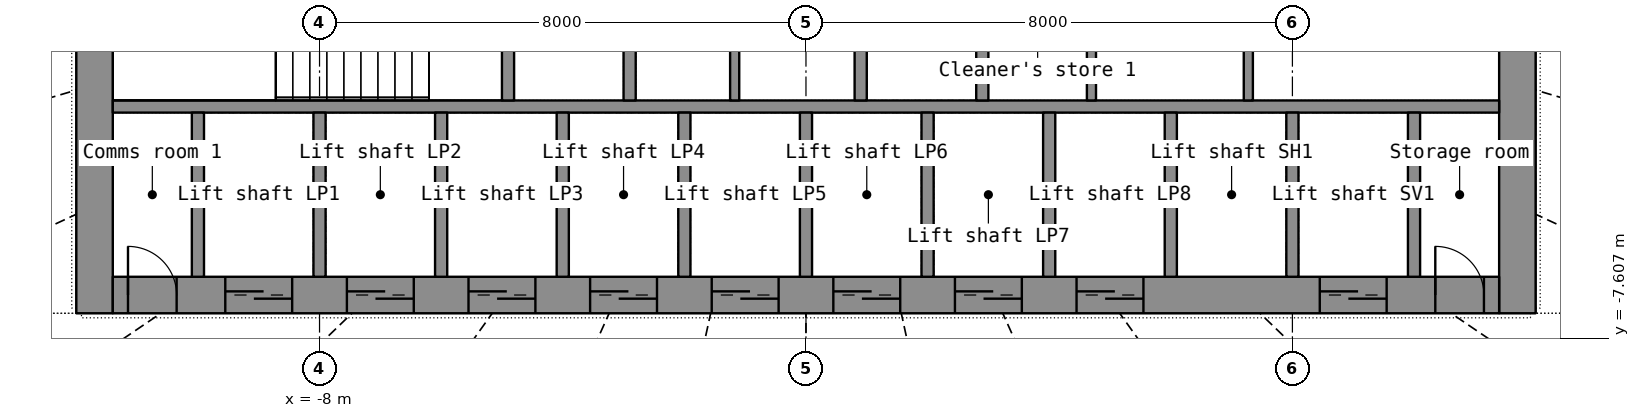
"""IFC4 building model, lengths in metres.
Left out: names, types, materials, properties, quantities, classifications, styles, units other than length and angle.
Written with IfcOpenShell. Run it as: python <this file> out.ifc"""

import sys

from ifc_helpers import new_model, si_unit, direction, frame, frame_2d, origin, place, context, subcontext, project, spatial, rectangle, extrude, element, fill, save


model = new_model("IFC4")
c1 = context("Model", 3, precision=1e-05, world=origin(), true_north=direction((0.0, 1.0)))
c2 = subcontext(c1, "Body", "Model", "MODEL_VIEW")
j1 = project(units=[si_unit("LENGTHUNIT", "METRE"), si_unit("PLANEANGLEUNIT", "RADIAN")], contexts=[c1])
p1 = place(None, origin())
s1 = spatial("IfcSite", under=j1, at=p1, CompositionType="ELEMENT")
p2 = place(p1, origin())
s2 = spatial("IfcBuilding", under=s1, at=p2, CompositionType="ELEMENT")
p3 = place(p2, frame((0.0, 0.0, 13.5)))
s3 = spatial("IfcBuildingStorey", under=s2, at=p3, CompositionType="ELEMENT", Elevation=13.5)
p4 = place(p3, frame((-11.7, -7.2, 0.0), z_axis=(0.0, 0.0, 1.0), x_axis=(0.0, 1.0, 0.0)))
e1 = element("IfcWall", 1, at=p4, inside=s3, PredefinedType="SHEAR", context=c2, shape_type="SweptSolid", body=[
    extrude(rectangle(XDim=14.4, YDim=0.6, at=frame_2d((7.2, 0.0))), origin(), (0.0, 0.0, 1.0), 6.1),
])
p5 = place(p4, frame((6.5, 0.0, 0.0)))
e2 = element("IfcOpeningElement", 2, at=p5, cuts=e1, PredefinedType="OPENING", context=c2, shape_type="SweptSolid", body=[
    extrude(rectangle(XDim=1.4, YDim=2.2, at=frame_2d((0.7, 1.1))), frame((0.0, 0.31, 0.0), z_axis=(0.0, -1.0, 0.0), x_axis=(1.0, 0.0, 0.0)), (0.0, 0.0, 1.0), 0.62),
])
p6 = place(p3, frame((11.7, -7.2, 0.0), z_axis=(0.0, 0.0, 1.0), x_axis=(0.0, 1.0, 0.0)))
e3 = element("IfcWall", 3, at=p6, inside=s3, PredefinedType="SHEAR", context=c2, shape_type="SweptSolid", body=[
    extrude(rectangle(XDim=14.4, YDim=0.6, at=frame_2d((7.2, 0.0))), origin(), (0.0, 0.0, 1.0), 6.1),
])
p7 = place(p6, frame((6.5, 0.0, 0.0)))
e4 = element("IfcOpeningElement", 4, at=p7, cuts=e3, PredefinedType="OPENING", context=c2, shape_type="SweptSolid", body=[
    extrude(rectangle(XDim=1.4, YDim=2.2, at=frame_2d((0.7, 1.1))), frame((0.0, 0.31, 0.0), z_axis=(0.0, -1.0, 0.0), x_axis=(1.0, 0.0, 0.0)), (0.0, 0.0, 1.0), 0.62),
])
p8 = place(p3, frame((-11.4, -6.9, 0.0), z_axis=(0.0, 0.0, 1.0), x_axis=(1.0, 0.0, 0.0)))
e5 = element("IfcWall", 5, at=p8, inside=s3, PredefinedType="SHEAR", context=c2, shape_type="SweptSolid", body=[
    extrude(rectangle(XDim=22.8, YDim=0.6, at=frame_2d((11.4, 0.0))), origin(), (0.0, 0.0, 1.0), 6.1),
])
p9 = place(p8, frame((1.85, 0.0, 0.0)))
e6 = element("IfcOpeningElement", 6, at=p9, cuts=e5, PredefinedType="OPENING", context=c2, shape_type="SweptSolid", body=[
    extrude(rectangle(XDim=1.1, YDim=2.2, at=frame_2d((0.55, 1.1))), frame((0.0, 0.31, 0.0), z_axis=(0.0, -1.0, 0.0), x_axis=(1.0, 0.0, 0.0)), (0.0, 0.0, 1.0), 0.62),
])
p10 = place(p8, frame((3.85, 0.0, 0.0)))
e7 = element("IfcOpeningElement", 7, at=p10, cuts=e5, PredefinedType="OPENING", context=c2, shape_type="SweptSolid", body=[
    extrude(rectangle(XDim=1.1, YDim=2.2, at=frame_2d((0.55, 1.1))), frame((0.0, 0.31, 0.0), z_axis=(0.0, -1.0, 0.0), x_axis=(1.0, 0.0, 0.0)), (0.0, 0.0, 1.0), 0.62),
])
p11 = place(p8, frame((5.85, 0.0, 0.0)))
e8 = element("IfcOpeningElement", 8, at=p11, cuts=e5, PredefinedType="OPENING", context=c2, shape_type="SweptSolid", body=[
    extrude(rectangle(XDim=1.1, YDim=2.2, at=frame_2d((0.55, 1.1))), frame((0.0, 0.31, 0.0), z_axis=(0.0, -1.0, 0.0), x_axis=(1.0, 0.0, 0.0)), (0.0, 0.0, 1.0), 0.62),
])
p12 = place(p8, frame((7.85, 0.0, 0.0)))
e9 = element("IfcOpeningElement", 9, at=p12, cuts=e5, PredefinedType="OPENING", context=c2, shape_type="SweptSolid", body=[
    extrude(rectangle(XDim=1.1, YDim=2.2, at=frame_2d((0.55, 1.1))), frame((0.0, 0.31, 0.0), z_axis=(0.0, -1.0, 0.0), x_axis=(1.0, 0.0, 0.0)), (0.0, 0.0, 1.0), 0.62),
])
p13 = place(p8, frame((9.85, 0.0, 0.0)))
e10 = element("IfcOpeningElement", 10, at=p13, cuts=e5, PredefinedType="OPENING", context=c2, shape_type="SweptSolid", body=[
    extrude(rectangle(XDim=1.1, YDim=2.2, at=frame_2d((0.55, 1.1))), frame((0.0, 0.31, 0.0), z_axis=(0.0, -1.0, 0.0), x_axis=(1.0, 0.0, 0.0)), (0.0, 0.0, 1.0), 0.62),
])
p14 = place(p8, frame((11.85, 0.0, 0.0)))
e11 = element("IfcOpeningElement", 11, at=p14, cuts=e5, PredefinedType="OPENING", context=c2, shape_type="SweptSolid", body=[
    extrude(rectangle(XDim=1.1, YDim=2.2, at=frame_2d((0.55, 1.1))), frame((0.0, 0.31, 0.0), z_axis=(0.0, -1.0, 0.0), x_axis=(1.0, 0.0, 0.0)), (0.0, 0.0, 1.0), 0.62),
])
p15 = place(p8, frame((13.85, 0.0, 0.0)))
e12 = element("IfcOpeningElement", 12, at=p15, cuts=e5, PredefinedType="OPENING", context=c2, shape_type="SweptSolid", body=[
    extrude(rectangle(XDim=1.1, YDim=2.2, at=frame_2d((0.55, 1.1))), frame((0.0, 0.31, 0.0), z_axis=(0.0, -1.0, 0.0), x_axis=(1.0, 0.0, 0.0)), (0.0, 0.0, 1.0), 0.62),
])
p16 = place(p8, frame((15.85, 0.0, 0.0)))
e13 = element("IfcOpeningElement", 13, at=p16, cuts=e5, PredefinedType="OPENING", context=c2, shape_type="SweptSolid", body=[
    extrude(rectangle(XDim=1.1, YDim=2.2, at=frame_2d((0.55, 1.1))), frame((0.0, 0.31, 0.0), z_axis=(0.0, -1.0, 0.0), x_axis=(1.0, 0.0, 0.0)), (0.0, 0.0, 1.0), 0.62),
])
p17 = place(p8, frame((19.85, 0.0, 0.0)))
e14 = element("IfcOpeningElement", 14, at=p17, cuts=e5, PredefinedType="OPENING", context=c2, shape_type="SweptSolid", body=[
    extrude(rectangle(XDim=1.1, YDim=2.2, at=frame_2d((0.55, 1.1))), frame((0.0, 0.31, 0.0), z_axis=(0.0, -1.0, 0.0), x_axis=(1.0, 0.0, 0.0)), (0.0, 0.0, 1.0), 0.62),
])
p18 = place(p8, frame((0.25, 0.0, 0.0)))
e15 = element("IfcOpeningElement", 15, at=p18, cuts=e5, PredefinedType="OPENING", context=c2, shape_type="SweptSolid", body=[
    extrude(rectangle(XDim=0.8, YDim=2.05, at=frame_2d((0.4, 1.025))), frame((0.0, 0.31, 0.0), z_axis=(0.0, -1.0, 0.0), x_axis=(1.0, 0.0, 0.0)), (0.0, 0.0, 1.0), 0.62),
])
p19 = place(p8, frame((21.75, 0.0, 0.0)))
e16 = element("IfcOpeningElement", 16, at=p19, cuts=e5, PredefinedType="OPENING", context=c2, shape_type="SweptSolid", body=[
    extrude(rectangle(XDim=0.8, YDim=2.05, at=frame_2d((0.4, 1.025))), frame((0.0, 0.31, 0.0), z_axis=(0.0, -1.0, 0.0), x_axis=(1.0, 0.0, 0.0)), (0.0, 0.0, 1.0), 0.62),
])
p20 = place(p3, frame((-11.4, -3.8, 0.0), z_axis=(0.0, 0.0, 1.0), x_axis=(1.0, 0.0, 0.0)))
e17 = element("IfcWall", 17, at=p20, inside=s3, PredefinedType="SHEAR", context=c2, shape_type="SweptSolid", body=[
    extrude(rectangle(XDim=22.8, YDim=0.2, at=frame_2d((11.4, 0.0))), origin(), (0.0, 0.0, 1.0), 6.1),
])
for number, where, z_axis, x_axis in (
    (18, (-10.0, -6.6, 0.0), (0.0, 0.0, 1.0), (0.0, 1.0, 0.0)),
    (19, (-8.0, -6.6, 0.0), (0.0, 0.0, 1.0), (0.0, 1.0, 0.0)),
    (20, (-6.0, -6.6, 0.0), (0.0, 0.0, 1.0), (0.0, 1.0, 0.0)),
    (21, (-4.0, -6.6, 0.0), (0.0, 0.0, 1.0), (0.0, 1.0, 0.0)),
    (22, (-2.0, -6.6, 0.0), (0.0, 0.0, 1.0), (0.0, 1.0, 0.0)),
    (23, (0.0, -6.6, 0.0), (0.0, 0.0, 1.0), (0.0, 1.0, 0.0)),
    (24, (2.0, -6.6, 0.0), (0.0, 0.0, 1.0), (0.0, 1.0, 0.0)),
    (25, (4.0, -6.6, 0.0), (0.0, 0.0, 1.0), (0.0, 1.0, 0.0)),
    (26, (6.0, -6.6, 0.0), (0.0, 0.0, 1.0), (0.0, 1.0, 0.0)),
    (27, (8.0, -6.6, 0.0), (0.0, 0.0, 1.0), (0.0, 1.0, 0.0)),
    (28, (10.0, -6.6, 0.0), (0.0, 0.0, 1.0), (0.0, 1.0, 0.0)),
):
    element("IfcWall", number, at=place(p3, frame(where, z_axis=z_axis, x_axis=x_axis)), inside=s3, PredefinedType="SHEAR", context=c2, shape_type="SweptSolid", body=[
        extrude(rectangle(XDim=2.7, YDim=0.2, at=frame_2d((1.35, 0.0))), origin(), (0.0, 0.0, 1.0), 6.1),
    ])
p21 = place(p3, frame((-2.9, -3.7, 0.0), z_axis=(0.0, 0.0, 1.0), x_axis=(0.0, 1.0, 0.0)))
e29 = element("IfcWall", 29, at=p21, inside=s3, PredefinedType="SHEAR", context=c2, shape_type="SweptSolid", body=[
    extrude(rectangle(XDim=7.4, YDim=0.2, at=frame_2d((3.7, 0.0))), origin(), (0.0, 0.0, 1.0), 6.1),
])
p22 = place(p21, frame((3.1, 0.0, 0.0)))
e30 = element("IfcOpeningElement", 30, at=p22, cuts=e29, PredefinedType="OPENING", context=c2, shape_type="SweptSolid", body=[
    extrude(rectangle(XDim=1.2, YDim=2.2, at=frame_2d((0.6, 1.1))), frame((0.0, 0.11, 0.0), z_axis=(0.0, -1.0, 0.0), x_axis=(1.0, 0.0, 0.0)), (0.0, 0.0, 1.0), 0.22),
])
p23 = place(p3, frame((2.9, -3.7, 0.0), z_axis=(0.0, 0.0, 1.0), x_axis=(0.0, 1.0, 0.0)))
e31 = element("IfcWall", 31, at=p23, inside=s3, PredefinedType="SHEAR", context=c2, shape_type="SweptSolid", body=[
    extrude(rectangle(XDim=7.4, YDim=0.2, at=frame_2d((3.7, 0.0))), origin(), (0.0, 0.0, 1.0), 6.1),
])
p24 = place(p23, frame((3.1, 0.0, 0.0)))
e32 = element("IfcOpeningElement", 32, at=p24, cuts=e31, PredefinedType="OPENING", context=c2, shape_type="SweptSolid", body=[
    extrude(rectangle(XDim=1.2, YDim=2.2, at=frame_2d((0.6, 1.1))), frame((0.0, 0.11, 0.0), z_axis=(0.0, -1.0, 0.0), x_axis=(1.0, 0.0, 0.0)), (0.0, 0.0, 1.0), 0.22),
])
for number, where, z_axis, x_axis in (
    (33, (0.9, -3.7, 0.0), (0.0, 0.0, 1.0), (0.0, 1.0, 0.0)),
    (34, (-4.9, -3.7, 0.0), (0.0, 0.0, 1.0), (0.0, 1.0, 0.0)),
):
    element("IfcWall", number, at=place(p3, frame(where, z_axis=z_axis, x_axis=x_axis)), inside=s3, PredefinedType="SHEAR", context=c2, shape_type="SweptSolid", body=[
        extrude(rectangle(XDim=2.35, YDim=0.2, at=frame_2d((1.175, 0.0))), origin(), (0.0, 0.0, 1.0), 6.1),
    ])
for number, where, z_axis, x_axis in (
    (35, (4.695, -3.7, 0.0), (0.0, 0.0, 1.0), (0.0, 1.0, 0.0)),
    (36, (7.275, -3.7, 0.0), (0.0, 0.0, 1.0), (0.0, 1.0, 0.0)),
    (37, (-1.173, -3.7, 0.0), (0.0, 0.0, 1.0), (0.0, 1.0, 0.0)),
):
    element("IfcWall", number, at=place(p3, frame(where, z_axis=z_axis, x_axis=x_axis)), inside=s3, PredefinedType="PARTITIONING", context=c2, shape_type="SweptSolid", body=[
        extrude(rectangle(XDim=2.35, YDim=0.15, at=frame_2d((1.175, 0.0))), origin(), (0.0, 0.0, 1.0), 6.1),
    ])
p25 = place(p9, origin())
e38 = element("IfcDoor", 38, at=p25, inside=s3, OperationType="DOUBLE_DOOR_SLIDING", PredefinedType="DOOR", context=c2, shape_type="SweptSolid", body=[
    extrude(rectangle(XDim=1.1, YDim=2.2, at=frame_2d((0.55, 1.1))), frame((0.0, 0.025, 0.0), z_axis=(0.0, -1.0, 0.0), x_axis=(1.0, 0.0, 0.0)), (0.0, 0.0, 1.0), 0.05),
])
fill(e6, e38)
p26 = place(p10, origin())
e39 = element("IfcDoor", 39, at=p26, inside=s3, OperationType="DOUBLE_DOOR_SLIDING", PredefinedType="DOOR", context=c2, shape_type="SweptSolid", body=[
    extrude(rectangle(XDim=1.1, YDim=2.2, at=frame_2d((0.55, 1.1))), frame((0.0, 0.025, 0.0), z_axis=(0.0, -1.0, 0.0), x_axis=(1.0, 0.0, 0.0)), (0.0, 0.0, 1.0), 0.05),
])
fill(e7, e39)
p27 = place(p11, origin())
e40 = element("IfcDoor", 40, at=p27, inside=s3, OperationType="DOUBLE_DOOR_SLIDING", PredefinedType="DOOR", context=c2, shape_type="SweptSolid", body=[
    extrude(rectangle(XDim=1.1, YDim=2.2, at=frame_2d((0.55, 1.1))), frame((0.0, 0.025, 0.0), z_axis=(0.0, -1.0, 0.0), x_axis=(1.0, 0.0, 0.0)), (0.0, 0.0, 1.0), 0.05),
])
fill(e8, e40)
p28 = place(p12, origin())
e41 = element("IfcDoor", 41, at=p28, inside=s3, OperationType="DOUBLE_DOOR_SLIDING", PredefinedType="DOOR", context=c2, shape_type="SweptSolid", body=[
    extrude(rectangle(XDim=1.1, YDim=2.2, at=frame_2d((0.55, 1.1))), frame((0.0, 0.025, 0.0), z_axis=(0.0, -1.0, 0.0), x_axis=(1.0, 0.0, 0.0)), (0.0, 0.0, 1.0), 0.05),
])
fill(e9, e41)
p29 = place(p13, origin())
e42 = element("IfcDoor", 42, at=p29, inside=s3, OperationType="DOUBLE_DOOR_SLIDING", PredefinedType="DOOR", context=c2, shape_type="SweptSolid", body=[
    extrude(rectangle(XDim=1.1, YDim=2.2, at=frame_2d((0.55, 1.1))), frame((0.0, 0.025, 0.0), z_axis=(0.0, -1.0, 0.0), x_axis=(1.0, 0.0, 0.0)), (0.0, 0.0, 1.0), 0.05),
])
fill(e10, e42)
p30 = place(p14, origin())
e43 = element("IfcDoor", 43, at=p30, inside=s3, OperationType="DOUBLE_DOOR_SLIDING", PredefinedType="DOOR", context=c2, shape_type="SweptSolid", body=[
    extrude(rectangle(XDim=1.1, YDim=2.2, at=frame_2d((0.55, 1.1))), frame((0.0, 0.025, 0.0), z_axis=(0.0, -1.0, 0.0), x_axis=(1.0, 0.0, 0.0)), (0.0, 0.0, 1.0), 0.05),
])
fill(e11, e43)
p31 = place(p15, origin())
e44 = element("IfcDoor", 44, at=p31, inside=s3, OperationType="DOUBLE_DOOR_SLIDING", PredefinedType="DOOR", context=c2, shape_type="SweptSolid", body=[
    extrude(rectangle(XDim=1.1, YDim=2.2, at=frame_2d((0.55, 1.1))), frame((0.0, 0.025, 0.0), z_axis=(0.0, -1.0, 0.0), x_axis=(1.0, 0.0, 0.0)), (0.0, 0.0, 1.0), 0.05),
])
fill(e12, e44)
p32 = place(p16, origin())
e45 = element("IfcDoor", 45, at=p32, inside=s3, OperationType="DOUBLE_DOOR_SLIDING", PredefinedType="DOOR", context=c2, shape_type="SweptSolid", body=[
    extrude(rectangle(XDim=1.1, YDim=2.2, at=frame_2d((0.55, 1.1))), frame((0.0, 0.025, 0.0), z_axis=(0.0, -1.0, 0.0), x_axis=(1.0, 0.0, 0.0)), (0.0, 0.0, 1.0), 0.05),
])
fill(e13, e45)
p33 = place(p17, origin())
e46 = element("IfcDoor", 46, at=p33, inside=s3, OperationType="DOUBLE_DOOR_SLIDING", PredefinedType="DOOR", context=c2, shape_type="SweptSolid", body=[
    extrude(rectangle(XDim=1.1, YDim=2.2, at=frame_2d((0.55, 1.1))), frame((0.0, 0.025, 0.0), z_axis=(0.0, -1.0, 0.0), x_axis=(1.0, 0.0, 0.0)), (0.0, 0.0, 1.0), 0.05),
])
fill(e14, e46)
p34 = place(p18, origin())
e47 = element("IfcDoor", 47, at=p34, inside=s3, OperationType="SINGLE_SWING_LEFT", PredefinedType="DOOR", context=c2, shape_type="SweptSolid", body=[
    extrude(rectangle(XDim=0.8, YDim=2.05, at=frame_2d((0.4, 1.025))), frame((0.0, 0.025, 0.0), z_axis=(0.0, -1.0, 0.0), x_axis=(1.0, 0.0, 0.0)), (0.0, 0.0, 1.0), 0.05),
])
fill(e15, e47)
p35 = place(p19, origin())
e48 = element("IfcDoor", 48, at=p35, inside=s3, OperationType="SINGLE_SWING_LEFT", PredefinedType="DOOR", context=c2, shape_type="SweptSolid", body=[
    extrude(rectangle(XDim=0.8, YDim=2.05, at=frame_2d((0.4, 1.025))), frame((0.0, 0.025, 0.0), z_axis=(0.0, -1.0, 0.0), x_axis=(1.0, 0.0, 0.0)), (0.0, 0.0, 1.0), 0.05),
])
fill(e16, e48)
save(model, sys.argv[1])
